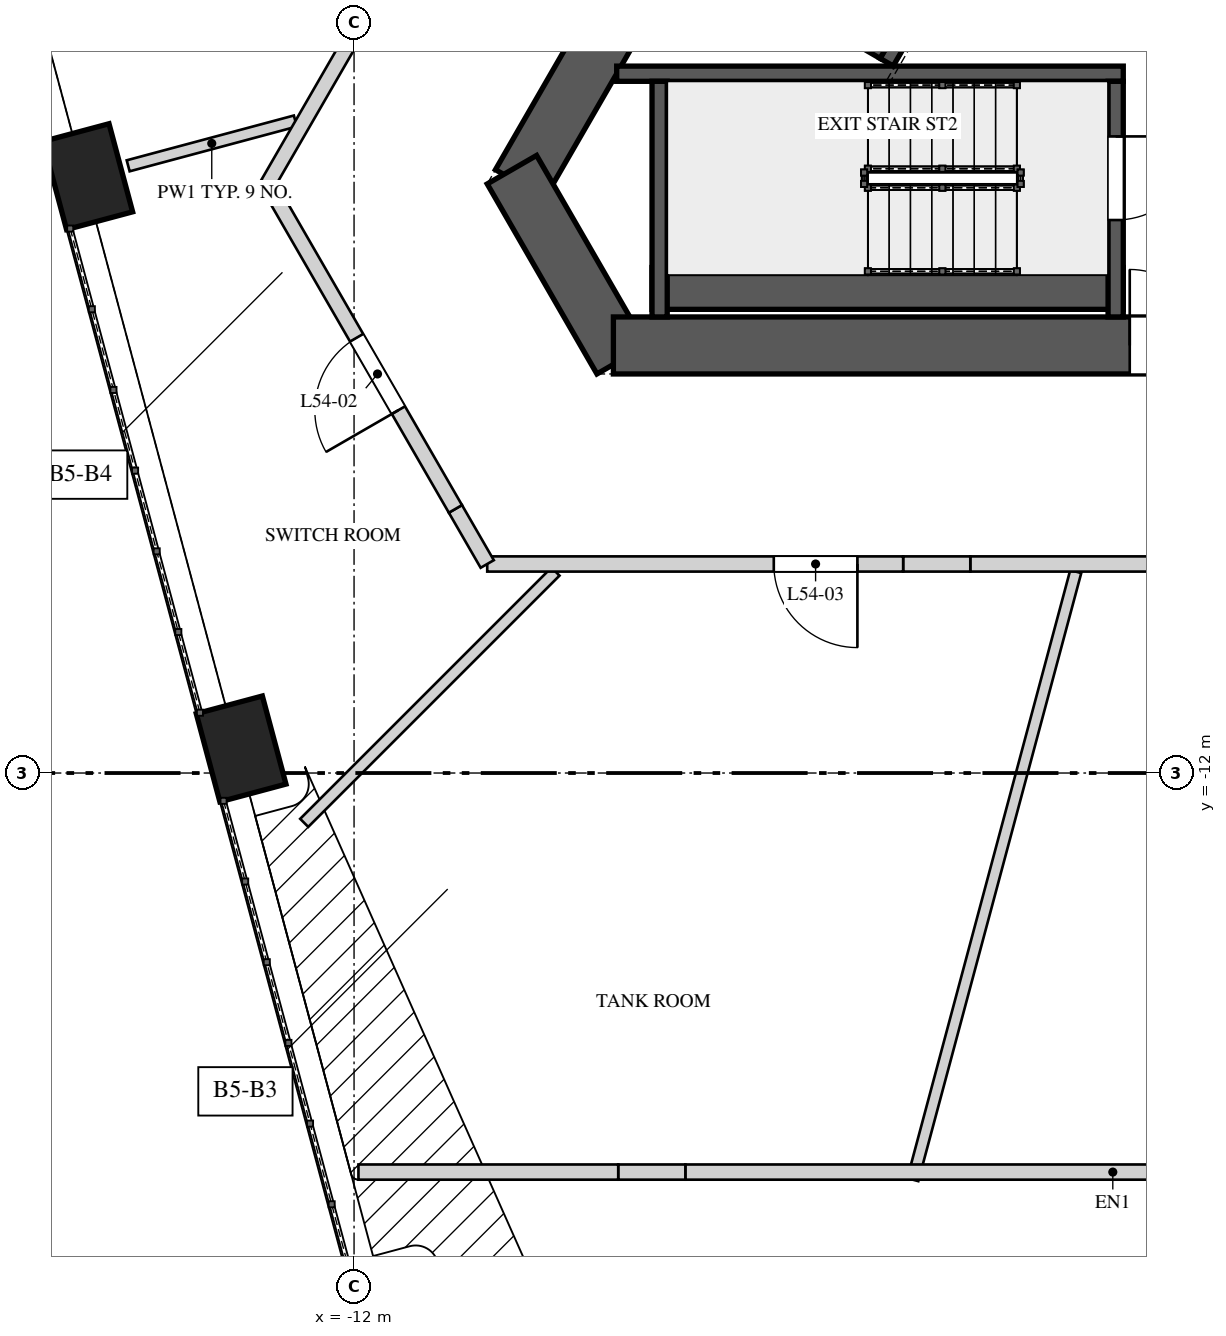
"""IFC4 building model, lengths in metres.
Left out: names, types, materials, properties, quantities, classifications, styles, units other than length and angle.
Written with IfcOpenShell. Run it as: python <this file> out.ifc"""

import sys

from ifc_helpers import new_model, si_unit, direction, frame, frame_2d, origin, origin_2d, place, context, subcontext, project, spatial, rectangle, extrude, element, fill, save


model = new_model("IFC4")
c1 = context("Model", 3, precision=1e-05, world=origin(), true_north=direction((0.0, 1.0)))
c2 = subcontext(c1, "Body", "Model", "MODEL_VIEW")
j1 = project(units=[si_unit("LENGTHUNIT", "METRE"), si_unit("PLANEANGLEUNIT", "RADIAN")], contexts=[c1])
p1 = place(None, origin())
s1 = spatial("IfcSite", under=j1, at=p1, CompositionType="ELEMENT")
p2 = place(p1, origin())
s2 = spatial("IfcBuilding", under=s1, at=p2, CompositionType="ELEMENT")
p3 = place(p2, frame((0.0, 0.0, 232.0)))
s3 = spatial("IfcBuildingStorey", under=s2, at=p3, CompositionType="ELEMENT", Elevation=232.0)
p4 = place(p3, frame((-1.227, 10.625, 0.0), z_axis=(0.0, 0.0, 1.0), x_axis=(-0.500002161919, -0.866024155596, 0.0)))
e1 = element("IfcWall", 1, at=p4, inside=s3, PredefinedType="SHEAR", context=c2, shape_type="SweptSolid", body=[
    extrude(rectangle(XDim=17.176, YDim=0.75, at=frame_2d((8.588, 0.0))), origin(), (0.0, 0.0, 1.0), 5.2),
])
p5 = place(p4, frame((6.793, 0.0, 0.0)))
e2 = element("IfcOpeningElement", 2, at=p5, cuts=e1, PredefinedType="OPENING", context=c2, shape_type="SweptSolid", body=[
    extrude(rectangle(XDim=1.0, YDim=2.4, at=frame_2d((0.5, 1.2))), frame((0.0, 0.385, 0.0), z_axis=(0.0, -1.0, 0.0), x_axis=(1.0, 0.0, 0.0)), (0.0, 0.0, 1.0), 0.77),
])
p6 = place(p3, frame((-9.923, -4.062, 0.0), z_axis=(0.0, 0.0, 1.0), x_axis=(0.499995765644, -0.866027848477, 0.0)))
e3 = element("IfcWall", 3, at=p6, inside=s3, PredefinedType="SHEAR", context=c2, shape_type="SweptSolid", body=[
    extrude(rectangle(XDim=2.887, YDim=0.75, at=frame_2d((1.443, 0.0))), origin(), (0.0, 0.0, 1.0), 5.2),
])
p7 = place(p3, frame((-8.588, -6.375, 0.0), z_axis=(0.0, 0.0, 1.0), x_axis=(1.0, 0.0, 0.0)))
e4 = element("IfcWall", 4, at=p7, inside=s3, PredefinedType="SHEAR", context=c2, shape_type="SweptSolid", body=[
    extrude(rectangle(XDim=17.176, YDim=0.75, at=frame_2d((8.588, 0.0))), origin(), (0.0, 0.0, 1.0), 5.2),
])
p8 = place(p7, frame((6.793, 0.0, 0.0)))
e5 = element("IfcOpeningElement", 5, at=p8, cuts=e4, PredefinedType="OPENING", context=c2, shape_type="SweptSolid", body=[
    extrude(rectangle(XDim=1.0, YDim=2.4, at=frame_2d((0.5, 1.2))), frame((0.0, 0.385, 0.0), z_axis=(0.0, -1.0, 0.0), x_axis=(1.0, 0.0, 0.0)), (0.0, 0.0, 1.0), 0.77),
])
p9 = place(p7, frame((14.864, 0.0, 0.0)))
e6 = element("IfcOpeningElement", 6, at=p9, cuts=e4, PredefinedType="OPENING", context=c2, shape_type="SweptSolid", body=[
    extrude(rectangle(XDim=0.8, YDim=2.1, at=frame_2d((0.4, 1.05))), frame((0.0, 0.385, 0.0), z_axis=(0.0, -1.0, 0.0), x_axis=(1.0, 0.0, 0.0)), (0.0, 0.0, 1.0), 0.77),
])
for number, where, z_axis, x_axis in (
    (7, (-15.503, -4.154, 0.0), (0.0, 0.0, 1.0), (0.259, -0.966, 0.0)),
    (8, (-13.486, -11.683, 0.0), (0.0, 0.0, 1.0), (0.259, -0.966, 0.0)),
):
    element("IfcColumn", number, at=place(p3, frame(where, z_axis=z_axis, x_axis=x_axis)), inside=s3, PredefinedType="COLUMN", context=c2, shape_type="SweptSolid", body=[
        extrude(rectangle(XDim=1.2, YDim=0.9, at=origin_2d()), origin(), (0.0, 0.0, 1.0), 2.806),
    ])
p10 = place(p3, frame((-8.08, -5.625, 0.0), z_axis=(0.0, 0.0, 1.0), x_axis=(1.0, 0.0, 0.0)))
e9 = element("IfcWall", 9, at=p10, inside=s3, PredefinedType="SOLIDWALL", context=c2, shape_type="SweptSolid", body=[
    extrude(rectangle(XDim=6.2, YDim=0.55, at=frame_2d((3.1, 0.0))), origin(), (0.0, 0.0, 1.0), 4.85),
])
p11 = place(p3, frame((-8.545, -2.8, 0.0), z_axis=(0.0, 0.0, 1.0), x_axis=(1.0, 0.0, 0.0)))
e10 = element("IfcWall", 10, at=p11, inside=s3, PredefinedType="SOLIDWALL", context=c2, shape_type="SweptSolid", body=[
    extrude(rectangle(XDim=6.665, YDim=0.2, at=frame_2d((3.333, 0.0))), origin(), (0.0, 0.0, 1.0), 4.85),
])
p12 = place(p3, frame((-7.98, -2.9, 0.0), z_axis=(0.0, 0.0, 1.0), x_axis=(0.0, -1.0, 0.0)))
e11 = element("IfcWall", 11, at=p12, inside=s3, PredefinedType="SOLIDWALL", context=c2, shape_type="SweptSolid", body=[
    extrude(rectangle(XDim=3.1, YDim=0.2, at=frame_2d((1.55, 0.0))), origin(), (0.0, 0.0, 1.0), 4.85),
])
p13 = place(p3, frame((-1.98, -2.9, 0.0), z_axis=(0.0, 0.0, 1.0), x_axis=(0.0, -1.0, 0.0)))
e12 = element("IfcWall", 12, at=p13, inside=s3, PredefinedType="SOLIDWALL", context=c2, shape_type="SweptSolid", body=[
    extrude(rectangle(XDim=3.1, YDim=0.2, at=frame_2d((1.55, 0.0))), origin(), (0.0, 0.0, 1.0), 4.85),
])
p14 = place(p13, frame((0.725, 0.0, 0.0)))
e13 = element("IfcOpeningElement", 13, at=p14, cuts=e12, PredefinedType="OPENING", context=c2, shape_type="SweptSolid", body=[
    extrude(rectangle(XDim=1.1, YDim=2.4, at=frame_2d((0.55, 1.2))), frame((0.0, 0.11, 0.0), z_axis=(0.0, -1.0, 0.0), x_axis=(1.0, 0.0, 0.0)), (0.0, 0.0, 1.0), 0.22),
])
p15 = place(p3, frame((-2.243, 2.115, 0.0), z_axis=(0.0, 0.0, 1.0), x_axis=(-0.499996545922, -0.866027397988, 0.0)))
e14 = element("IfcWall", 14, at=p15, inside=s3, PredefinedType="SOLIDWALL", context=c2, shape_type="SweptSolid", body=[
    extrude(rectangle(XDim=5.5, YDim=0.2, at=frame_2d((2.75, 0.0))), origin(), (0.0, 0.0, 1.0), 4.85),
])
p16 = place(p15, frame((1.22, 0.0, 0.0)))
e15 = element("IfcOpeningElement", 15, at=p16, cuts=e14, PredefinedType="OPENING", context=c2, shape_type="SweptSolid", body=[
    extrude(rectangle(XDim=1.1, YDim=2.1, at=frame_2d((0.55, 1.05))), frame((0.0, 0.11, 0.0), z_axis=(0.0, -1.0, 0.0), x_axis=(1.0, 0.0, 0.0)), (0.0, 0.0, 1.0), 0.22),
])
p17 = place(p15, frame((3.525, 0.0, 0.0)))
e16 = element("IfcOpeningElement", 16, at=p17, cuts=e14, PredefinedType="OPENING", context=c2, shape_type="SweptSolid", body=[
    extrude(rectangle(XDim=1.1, YDim=2.1, at=frame_2d((0.55, 1.05))), frame((0.0, 0.11, 0.0), z_axis=(0.0, -1.0, 0.0), x_axis=(1.0, 0.0, 0.0)), (0.0, 0.0, 1.0), 0.22),
])
p18 = place(p3, frame((-5.03, -2.512, 0.0), z_axis=(0.0, 0.0, 1.0), x_axis=(-0.866032775405, 0.499987231761, 0.0)))
e17 = element("IfcWall", 17, at=p18, inside=s3, PredefinedType="SOLIDWALL", context=c2, shape_type="SweptSolid", body=[
    extrude(rectangle(XDim=2.9, YDim=0.2, at=frame_2d((1.45, 0.0))), origin(), (0.0, 0.0, 1.0), 4.85),
])
p19 = place(p3, frame((-12.772, -3.422, 0.0), z_axis=(0.0, 0.0, 1.0), x_axis=(-0.965924600635, -0.258823619262, 0.0)))
e18 = element("IfcWall", 18, at=p19, inside=s3, PredefinedType="PARTITIONING", context=c2, shape_type="SweptSolid", body=[
    extrude(rectangle(XDim=2.277, YDim=0.15, at=frame_2d((1.139, 0.0))), origin(), (0.0, 0.0, 1.0), 4.85),
])
p20 = place(p3, frame((-9.35, -9.35, 0.0), z_axis=(0.0, 0.0, 1.0), x_axis=(-0.707106781187, -0.707106781187, 0.0)))
e19 = element("IfcWall", 19, at=p20, inside=s3, PredefinedType="PARTITIONING", context=c2, shape_type="SweptSolid", body=[
    extrude(rectangle(XDim=4.675, YDim=0.15, at=frame_2d((2.337, 0.0))), origin(), (0.0, 0.0, 1.0), 4.85),
])
p21 = place(p3, frame((-2.505, -9.35, 0.0), z_axis=(0.0, 0.0, 1.0), x_axis=(-0.25881466832, -0.965926999034, 0.0)))
e20 = element("IfcWall", 20, at=p21, inside=s3, PredefinedType="PARTITIONING", context=c2, shape_type="SweptSolid", body=[
    extrude(rectangle(XDim=8.282, YDim=0.15, at=frame_2d((4.141, 0.0))), origin(), (0.0, 0.0, 1.0), 4.85),
])
p22 = place(p3, frame((1.743, -9.25, 0.0), z_axis=(0.0, 0.0, 1.0), x_axis=(-1.0, 0.0, 0.0)))
e21 = element("IfcWall", 21, at=p22, inside=s3, PredefinedType="SOLIDWALL", context=c2, shape_type="SweptSolid", body=[
    extrude(rectangle(XDim=5.635, YDim=0.2, at=frame_2d((2.818, 0.0))), origin(), (0.0, 0.0, 1.0), 4.85),
])
p23 = place(p3, frame((-3.893, -9.25, 0.0), z_axis=(0.0, 0.0, 1.0), x_axis=(-1.0, 0.0, 0.0)))
e22 = element("IfcWall", 22, at=p23, inside=s3, PredefinedType="SOLIDWALL", context=c2, shape_type="SweptSolid", body=[
    extrude(rectangle(XDim=0.884, YDim=0.2, at=frame_2d((0.442, 0.0))), origin(), (0.0, 0.0, 1.0), 3.95),
])
p24 = place(p3, frame((-4.776, -9.25, 0.0), z_axis=(0.0, 0.0, 1.0), x_axis=(-1.0, 0.0, 0.0)))
e23 = element("IfcWall", 23, at=p24, inside=s3, PredefinedType="SOLIDWALL", context=c2, shape_type="SweptSolid", body=[
    extrude(rectangle(XDim=5.472, YDim=0.2, at=frame_2d((2.736, 0.0))), origin(), (0.0, 0.0, 1.0), 4.85),
])
p25 = place(p24, frame((0.602, 0.0, 0.0)))
e24 = element("IfcOpeningElement", 24, at=p25, cuts=e23, PredefinedType="OPENING", context=c2, shape_type="SweptSolid", body=[
    extrude(rectangle(XDim=1.1, YDim=2.2, at=frame_2d((0.55, 1.1))), frame((0.0, 0.11, 0.0), z_axis=(0.0, -1.0, 0.0), x_axis=(1.0, 0.0, 0.0)), (0.0, 0.0, 1.0), 0.22),
])
p26 = place(p3, frame((-10.248, -9.25, 0.0), z_axis=(0.0, 0.0, 1.0), x_axis=(-0.499966538646, 0.866044721844, 0.0)))
e25 = element("IfcWall", 25, at=p26, inside=s3, PredefinedType="SOLIDWALL", context=c2, shape_type="SweptSolid", body=[
    extrude(rectangle(XDim=0.837, YDim=0.2, at=frame_2d((0.418, 0.0))), origin(), (0.0, 0.0, 1.0), 4.15),
])
p27 = place(p3, frame((-10.667, -8.525, 0.0), z_axis=(0.0, 0.0, 1.0), x_axis=(-0.500000720929, 0.866024987556, 0.0)))
e26 = element("IfcWall", 26, at=p27, inside=s3, PredefinedType="SOLIDWALL", context=c2, shape_type="SweptSolid", body=[
    extrude(rectangle(XDim=4.937, YDim=0.2, at=frame_2d((2.468, 0.0))), origin(), (0.0, 0.0, 1.0), 4.85),
])
p28 = place(p27, frame((1.5, 0.0, 0.0)))
e27 = element("IfcOpeningElement", 27, at=p28, cuts=e26, PredefinedType="OPENING", context=c2, shape_type="SweptSolid", body=[
    extrude(rectangle(XDim=1.1, YDim=2.2, at=frame_2d((0.55, 1.1))), frame((0.0, 0.11, 0.0), z_axis=(0.0, -1.0, 0.0), x_axis=(1.0, 0.0, 0.0)), (0.0, 0.0, 1.0), 0.22),
])
p29 = place(p3, frame((-13.135, -4.25, 0.0), z_axis=(0.0, 0.0, 1.0), x_axis=(0.500001094379, 0.866024771944, 0.0)))
e28 = element("IfcWall", 28, at=p29, inside=s3, PredefinedType="SOLIDWALL", context=c2, shape_type="SweptSolid", body=[
    extrude(rectangle(XDim=2.604, YDim=0.2, at=frame_2d((1.302, 0.0))), origin(), (0.0, 0.0, 1.0), 4.85),
])
p30 = place(p3, frame((3.606, -17.25, 0.0), z_axis=(0.0, 0.0, 1.0), x_axis=(-1.0, 0.0, 0.0)))
e29 = element("IfcWall", 29, at=p30, inside=s3, PredefinedType="SOLIDWALL", context=c2, shape_type="SweptSolid", body=[
    extrude(rectangle(XDim=11.247, YDim=0.2, at=frame_2d((5.624, 0.0))), origin(), (0.0, 0.0, 1.0), 4.85),
])
p31 = place(p30, frame((2.715, 0.0, 0.0)))
e30 = element("IfcOpeningElement", 30, at=p31, cuts=e29, PredefinedType="OPENING", context=c2, shape_type="SweptSolid", body=[
    extrude(rectangle(XDim=1.6, YDim=2.3, at=frame_2d((0.8, 1.15))), frame((0.0, 0.11, 0.0), z_axis=(0.0, -1.0, 0.0), x_axis=(1.0, 0.0, 0.0)), (0.0, 0.0, 1.0), 0.22),
])
p32 = place(p3, frame((-7.641, -17.25, 0.0), z_axis=(0.0, 0.0, 1.0), x_axis=(-1.0, 0.0, 0.0)))
e31 = element("IfcWall", 31, at=p32, inside=s3, PredefinedType="SOLIDWALL", context=c2, shape_type="SweptSolid", body=[
    extrude(rectangle(XDim=0.884, YDim=0.2, at=frame_2d((0.442, 0.0))), origin(), (0.0, 0.0, 1.0), 3.95),
])
p33 = place(p3, frame((-8.525, -17.25, 0.0), z_axis=(0.0, 0.0, 1.0), x_axis=(-1.0, 0.0, 0.0)))
e32 = element("IfcWall", 32, at=p33, inside=s3, PredefinedType="SOLIDWALL", context=c2, shape_type="SweptSolid", body=[
    extrude(rectangle(XDim=3.418, YDim=0.2, at=frame_2d((1.709, 0.0))), origin(), (0.0, 0.0, 1.0), 4.85),
])
p34 = place(p14, origin())
e33 = element("IfcDoor", 33, at=p34, inside=s3, OperationType="SINGLE_SWING_LEFT", PredefinedType="DOOR", context=c2, shape_type="SweptSolid", body=[
    extrude(rectangle(XDim=1.1, YDim=2.4, at=frame_2d((0.55, 1.2))), frame((0.0, 0.025, 0.0), z_axis=(0.0, -1.0, 0.0), x_axis=(1.0, 0.0, 0.0)), (0.0, 0.0, 1.0), 0.05),
])
fill(e13, e33)
p35 = place(p8, origin())
e34 = element("IfcDoor", 34, at=p35, inside=s3, OperationType="SINGLE_SWING_LEFT", PredefinedType="DOOR", context=c2, shape_type="SweptSolid", body=[
    extrude(rectangle(XDim=1.0, YDim=2.4, at=frame_2d((0.5, 1.2))), frame((0.0, 0.025, 0.0), z_axis=(0.0, -1.0, 0.0), x_axis=(1.0, 0.0, 0.0)), (0.0, 0.0, 1.0), 0.05),
])
fill(e5, e34)
p36 = place(p28, origin())
e35 = element("IfcDoor", 35, at=p36, inside=s3, OperationType="SINGLE_SWING_RIGHT", PredefinedType="DOOR", context=c2, shape_type="SweptSolid", body=[
    extrude(rectangle(XDim=1.1, YDim=2.2, at=frame_2d((0.55, 1.1))), frame((0.0, 0.025, 0.0), z_axis=(0.0, -1.0, 0.0), x_axis=(1.0, 0.0, 0.0)), (0.0, 0.0, 1.0), 0.05),
])
fill(e27, e35)
p37 = place(p25, origin())
e36 = element("IfcDoor", 36, at=p37, inside=s3, OperationType="SINGLE_SWING_LEFT", PredefinedType="DOOR", context=c2, shape_type="SweptSolid", body=[
    extrude(rectangle(XDim=1.1, YDim=2.2, at=frame_2d((0.55, 1.1))), frame((0.0, 0.025, 0.0), z_axis=(0.0, -1.0, 0.0), x_axis=(1.0, 0.0, 0.0)), (0.0, 0.0, 1.0), 0.05),
])
fill(e24, e36)
save(model, sys.argv[1])
